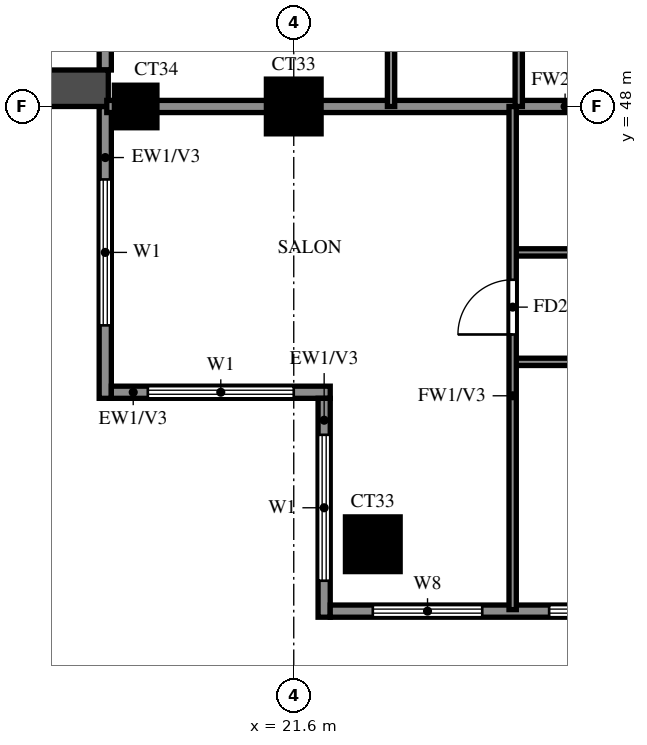
"""IFC4 building model, lengths in metres.
Left out: names, types, materials, properties, quantities, classifications, styles, units other than length and angle.
Written with IfcOpenShell. Run it as: python <this file> out.ifc"""

import sys

from ifc_helpers import new_model, si_unit, direction, frame, frame_2d, origin, origin_2d, place, context, subcontext, project, spatial, rectangle, extrude, source, transform, mapped, element, fill, save


model = new_model("IFC4")
c1 = context("Model", 3, precision=1e-05, world=origin(), true_north=direction((0.0, 1.0)))
c2 = subcontext(c1, "Body", "Model", "MODEL_VIEW")
j1 = project(units=[si_unit("LENGTHUNIT", "METRE"), si_unit("PLANEANGLEUNIT", "RADIAN")], contexts=[c1])
p1 = place(None, origin())
s1 = spatial("IfcSite", under=j1, at=p1, CompositionType="ELEMENT")
p2 = place(p1, origin())
s2 = spatial("IfcBuilding", under=s1, at=p2, CompositionType="ELEMENT")
p3 = place(p2, frame((0.0, 0.0, 225.5)))
s3 = spatial("IfcBuildingStorey", under=s2, at=p3, CompositionType="ELEMENT", Elevation=225.5)
m1 = source(origin(), c2, "Body", "SweptSolid", [
    extrude(rectangle(XDim=0.9, YDim=0.9, at=origin_2d()), origin(), (0.0, 0.0, 1.0), 3.22),
])
p4 = place(p3, frame((22.9, 40.8, 0.0), z_axis=(0.0, 0.0, 1.0), x_axis=(1.0, 0.0, 0.0)))
e1 = element("IfcColumn", 1, at=p4, inside=s3, PredefinedType="COLUMN", context=c2, shape_type="MappedRepresentation", body=[
    mapped(m1, transform((0.0, 0.0, 0.0))),
])
m2 = source(origin(), c2, "Body", "SweptSolid", [
    extrude(rectangle(XDim=0.7, YDim=0.7, at=origin_2d()), origin(), (0.0, 0.0, 1.0), 3.22),
])
p5 = place(p3, frame((19.0, 48.0, 0.0), z_axis=(0.0, 0.0, 1.0), x_axis=(1.0, 0.0, 0.0)))
e2 = element("IfcColumn", 2, at=p5, inside=s3, PredefinedType="COLUMN", context=c2, shape_type="MappedRepresentation", body=[
    mapped(m2, transform((0.0, 0.0, 0.0))),
])
p6 = place(p3, frame((21.6, 48.0, 0.0), z_axis=(0.0, 0.0, 1.0), x_axis=(1.0, 0.0, 0.0)))
e3 = element("IfcColumn", 3, at=p6, inside=s3, PredefinedType="COLUMN", context=c2, shape_type="MappedRepresentation", body=[
    mapped(m1, transform((0.0, 0.0, 0.0))),
])
p7 = place(p3, frame((18.5, 54.6, 0.0), z_axis=(0.0, 0.0, 1.0), x_axis=(0.0, -1.0, 0.0)))
e4 = element("IfcWall", 4, at=p7, inside=s3, PredefinedType="SOLIDWALL", context=c2, shape_type="SweptSolid", body=[
    extrude(rectangle(XDim=6.0, YDim=0.2, at=frame_2d((3.0, 0.0))), origin(), (0.0, 0.0, 1.0), 3.22),
])
p8 = place(p7, frame((0.9, 0.0, 0.0)))
e5 = element("IfcOpeningElement", 5, at=p8, cuts=e4, PredefinedType="OPENING", context=c2, shape_type="SweptSolid", body=[
    extrude(rectangle(XDim=1.8, YDim=2.4, at=frame_2d((0.9, 1.2))), frame((0.0, 0.11, 0.0), z_axis=(0.0, -1.0, 0.0), x_axis=(1.0, 0.0, 0.0)), (0.0, 0.0, 1.0), 0.22),
])
p9 = place(p7, frame((3.5, 0.0, 0.6)))
e6 = element("IfcOpeningElement", 6, at=p9, cuts=e4, PredefinedType="OPENING", context=c2, shape_type="SweptSolid", body=[
    extrude(rectangle(XDim=1.8, YDim=2.4, at=frame_2d((0.9, 1.2))), frame((0.0, 0.11, 0.0), z_axis=(0.0, -1.0, 0.0), x_axis=(1.0, 0.0, 0.0)), (0.0, 0.0, 1.0), 0.22),
])
p10 = place(p3, frame((18.5, 48.0, 0.0), z_axis=(0.0, 0.0, 1.0), x_axis=(0.0, -1.0, 0.0)))
e7 = element("IfcWall", 7, at=p10, inside=s3, PredefinedType="SOLIDWALL", context=c2, shape_type="SweptSolid", body=[
    extrude(rectangle(XDim=4.8, YDim=0.2, at=frame_2d((2.4, 0.0))), origin(), (0.0, 0.0, 1.0), 3.22),
])
p11 = place(p10, frame((1.2, 0.0, 0.6)))
e8 = element("IfcOpeningElement", 8, at=p11, cuts=e7, PredefinedType="OPENING", context=c2, shape_type="SweptSolid", body=[
    extrude(rectangle(XDim=2.4, YDim=2.4, at=frame_2d((1.2, 1.2))), frame((0.0, 0.11, 0.0), z_axis=(0.0, -1.0, 0.0), x_axis=(1.0, 0.0, 0.0)), (0.0, 0.0, 1.0), 0.22),
])
p12 = place(p3, frame((18.6, 43.3, 0.0), z_axis=(0.0, 0.0, 1.0), x_axis=(1.0, 0.0, 0.0)))
e9 = element("IfcWall", 9, at=p12, inside=s3, PredefinedType="SOLIDWALL", context=c2, shape_type="SweptSolid", body=[
    extrude(rectangle(XDim=3.6, YDim=0.2, at=frame_2d((1.8, 0.0))), origin(), (0.0, 0.0, 1.0), 3.22),
])
p13 = place(p12, frame((0.6, 0.0, 0.6)))
e10 = element("IfcOpeningElement", 10, at=p13, cuts=e9, PredefinedType="OPENING", context=c2, shape_type="SweptSolid", body=[
    extrude(rectangle(XDim=2.4, YDim=2.4, at=frame_2d((1.2, 1.2))), frame((0.0, 0.11, 0.0), z_axis=(0.0, -1.0, 0.0), x_axis=(1.0, 0.0, 0.0)), (0.0, 0.0, 1.0), 0.22),
])
p14 = place(p3, frame((22.1, 43.2, 0.0), z_axis=(0.0, 0.0, 1.0), x_axis=(0.0, -1.0, 0.0)))
e11 = element("IfcWall", 11, at=p14, inside=s3, PredefinedType="SOLIDWALL", context=c2, shape_type="SweptSolid", body=[
    extrude(rectangle(XDim=3.6, YDim=0.2, at=frame_2d((1.8, 0.0))), origin(), (0.0, 0.0, 1.0), 3.22),
])
p15 = place(p14, frame((0.6, 0.0, 0.6)))
e12 = element("IfcOpeningElement", 12, at=p15, cuts=e11, PredefinedType="OPENING", context=c2, shape_type="SweptSolid", body=[
    extrude(rectangle(XDim=2.4, YDim=2.4, at=frame_2d((1.2, 1.2))), frame((0.0, 0.11, 0.0), z_axis=(0.0, -1.0, 0.0), x_axis=(1.0, 0.0, 0.0)), (0.0, 0.0, 1.0), 0.22),
])
p16 = place(p3, frame((22.2, 39.7, 0.0), z_axis=(0.0, 0.0, 1.0), x_axis=(1.0, 0.0, 0.0)))
e13 = element("IfcWall", 13, at=p16, inside=s3, PredefinedType="SOLIDWALL", context=c2, shape_type="SweptSolid", body=[
    extrude(rectangle(XDim=19.8, YDim=0.2, at=frame_2d((9.9, 0.0))), origin(), (0.0, 0.0, 1.0), 3.22),
])
p17 = place(p16, frame((9.3, 0.0, 0.0)))
e14 = element("IfcOpeningElement", 14, at=p17, cuts=e13, PredefinedType="OPENING", context=c2, shape_type="SweptSolid", body=[
    extrude(rectangle(XDim=1.8, YDim=2.4, at=frame_2d((0.9, 1.2))), frame((0.0, 0.11, 0.0), z_axis=(0.0, -1.0, 0.0), x_axis=(1.0, 0.0, 0.0)), (0.0, 0.0, 1.0), 0.22),
])
p18 = place(p16, frame((0.7, 0.0, 0.6)))
e15 = element("IfcOpeningElement", 15, at=p18, cuts=e13, PredefinedType="OPENING", context=c2, shape_type="SweptSolid", body=[
    extrude(rectangle(XDim=1.8, YDim=2.4, at=frame_2d((0.9, 1.2))), frame((0.0, 0.11, 0.0), z_axis=(0.0, -1.0, 0.0), x_axis=(1.0, 0.0, 0.0)), (0.0, 0.0, 1.0), 0.22),
])
p19 = place(p16, frame((3.6, 0.0, 0.6)))
e16 = element("IfcOpeningElement", 16, at=p19, cuts=e13, PredefinedType="OPENING", context=c2, shape_type="SweptSolid", body=[
    extrude(rectangle(XDim=2.4, YDim=2.4, at=frame_2d((1.2, 1.2))), frame((0.0, 0.11, 0.0), z_axis=(0.0, -1.0, 0.0), x_axis=(1.0, 0.0, 0.0)), (0.0, 0.0, 1.0), 0.22),
])
p20 = place(p16, frame((6.9, 0.0, 0.6)))
e17 = element("IfcOpeningElement", 17, at=p20, cuts=e13, PredefinedType="OPENING", context=c2, shape_type="SweptSolid", body=[
    extrude(rectangle(XDim=1.8, YDim=2.4, at=frame_2d((0.9, 1.2))), frame((0.0, 0.11, 0.0), z_axis=(0.0, -1.0, 0.0), x_axis=(1.0, 0.0, 0.0)), (0.0, 0.0, 1.0), 0.22),
])
p21 = place(p3, frame((18.55, 48.3, 0.0), z_axis=(0.0, 0.0, 1.0), x_axis=(-1.0, 0.0, 0.0)))
e18 = element("IfcWall", 18, at=p21, inside=s3, PredefinedType="SOLIDWALL", context=c2, shape_type="SweptSolid", body=[
    extrude(rectangle(XDim=2.85, YDim=0.6, at=frame_2d((1.425, 0.0))), origin(), (0.0, 0.0, 1.0), 2.85),
])
p22 = place(p3, frame((18.525, 48.0, 0.0), z_axis=(0.0, 0.0, 1.0), x_axis=(1.0, 0.0, 0.0)))
e19 = element("IfcWall", 19, at=p22, inside=s3, PredefinedType="SOLIDWALL", context=c2, shape_type="SweptSolid", body=[
    extrude(rectangle(XDim=15.075, YDim=0.2, at=frame_2d((7.538, 0.0))), origin(), (0.0, 0.0, 1.0), 3.22),
])
p23 = place(p3, frame((25.2, 43.8, 0.0), z_axis=(0.0, 0.0, 1.0), x_axis=(1.0, 0.0, 0.0)))
e20 = element("IfcWall", 20, at=p23, inside=s3, PredefinedType="PARTITIONING", context=c2, shape_type="SweptSolid", body=[
    extrude(rectangle(XDim=8.4, YDim=0.12, at=frame_2d((4.2, 0.0))), origin(), (0.0, 0.0, 1.0), 3.22),
])
p24 = place(p23, frame((1.35, 0.0, 0.0)))
e21 = element("IfcOpeningElement", 21, at=p24, cuts=e20, PredefinedType="OPENING", context=c2, shape_type="SweptSolid", body=[
    extrude(rectangle(XDim=0.9, YDim=2.1, at=frame_2d((0.45, 1.05))), frame((0.0, 0.07, 0.0), z_axis=(0.0, -1.0, 0.0), x_axis=(1.0, 0.0, 0.0)), (0.0, 0.0, 1.0), 0.14),
])
p25 = place(p23, frame((5.55, 0.0, 0.0)))
e22 = element("IfcOpeningElement", 22, at=p25, cuts=e20, PredefinedType="OPENING", context=c2, shape_type="SweptSolid", body=[
    extrude(rectangle(XDim=0.9, YDim=2.1, at=frame_2d((0.45, 1.05))), frame((0.0, 0.07, 0.0), z_axis=(0.0, -1.0, 0.0), x_axis=(1.0, 0.0, 0.0)), (0.0, 0.0, 1.0), 0.14),
])
p26 = place(p3, frame((25.2, 45.6, 0.0), z_axis=(0.0, 0.0, 1.0), x_axis=(1.0, 0.0, 0.0)))
e23 = element("IfcWall", 23, at=p26, inside=s3, PredefinedType="PARTITIONING", context=c2, shape_type="SweptSolid", body=[
    extrude(rectangle(XDim=6.0, YDim=0.12, at=frame_2d((3.0, 0.0))), origin(), (0.0, 0.0, 1.0), 3.22),
])
p27 = place(p26, frame((1.425, 0.0, 0.0)))
e24 = element("IfcOpeningElement", 24, at=p27, cuts=e23, PredefinedType="OPENING", context=c2, shape_type="SweptSolid", body=[
    extrude(rectangle(XDim=0.9, YDim=2.1, at=frame_2d((0.45, 1.05))), frame((0.0, 0.07, 0.0), z_axis=(0.0, -1.0, 0.0), x_axis=(1.0, 0.0, 0.0)), (0.0, 0.0, 1.0), 0.14),
])
p28 = place(p3, frame((23.2, 48.0, 0.0), z_axis=(0.0, 0.0, 1.0), x_axis=(0.0, 1.0, 0.0)))
e25 = element("IfcWall", 25, at=p28, inside=s3, PredefinedType="PARTITIONING", context=c2, shape_type="SweptSolid", body=[
    extrude(rectangle(XDim=25.2, YDim=0.12, at=frame_2d((12.6, 0.0))), origin(), (0.0, 0.0, 1.0), 3.22),
])
p29 = place(p28, frame((1.35, 0.0, 0.0)))
e26 = element("IfcOpeningElement", 26, at=p29, cuts=e25, PredefinedType="OPENING", context=c2, shape_type="SweptSolid", body=[
    extrude(rectangle(XDim=0.9, YDim=2.1, at=frame_2d((0.45, 1.05))), frame((0.0, 0.07, 0.0), z_axis=(0.0, -1.0, 0.0), x_axis=(1.0, 0.0, 0.0)), (0.0, 0.0, 1.0), 0.14),
])
p30 = place(p28, frame((4.95, 0.0, 0.0)))
e27 = element("IfcOpeningElement", 27, at=p30, cuts=e25, PredefinedType="OPENING", context=c2, shape_type="SweptSolid", body=[
    extrude(rectangle(XDim=0.9, YDim=2.1, at=frame_2d((0.45, 1.05))), frame((0.0, 0.07, 0.0), z_axis=(0.0, -1.0, 0.0), x_axis=(1.0, 0.0, 0.0)), (0.0, 0.0, 1.0), 0.14),
])
p31 = place(p28, frame((10.05, 0.0, 0.0)))
e28 = element("IfcOpeningElement", 28, at=p31, cuts=e25, PredefinedType="OPENING", context=c2, shape_type="SweptSolid", body=[
    extrude(rectangle(XDim=1.5, YDim=2.1, at=frame_2d((0.75, 1.05))), frame((0.0, 0.07, 0.0), z_axis=(0.0, -1.0, 0.0), x_axis=(1.0, 0.0, 0.0)), (0.0, 0.0, 1.0), 0.14),
])
p32 = place(p28, frame((15.75, 0.0, 0.0)))
e29 = element("IfcOpeningElement", 29, at=p32, cuts=e25, PredefinedType="OPENING", context=c2, shape_type="SweptSolid", body=[
    extrude(rectangle(XDim=0.9, YDim=2.1, at=frame_2d((0.45, 1.05))), frame((0.0, 0.07, 0.0), z_axis=(0.0, -1.0, 0.0), x_axis=(1.0, 0.0, 0.0)), (0.0, 0.0, 1.0), 0.14),
])
p33 = place(p28, frame((19.35, 0.0, 0.0)))
e30 = element("IfcOpeningElement", 30, at=p33, cuts=e25, PredefinedType="OPENING", context=c2, shape_type="SweptSolid", body=[
    extrude(rectangle(XDim=0.9, YDim=2.1, at=frame_2d((0.45, 1.05))), frame((0.0, 0.07, 0.0), z_axis=(0.0, -1.0, 0.0), x_axis=(1.0, 0.0, 0.0)), (0.0, 0.0, 1.0), 0.14),
])
p34 = place(p28, frame((22.95, 0.0, 0.0)))
e31 = element("IfcOpeningElement", 31, at=p34, cuts=e25, PredefinedType="OPENING", context=c2, shape_type="SweptSolid", body=[
    extrude(rectangle(XDim=0.9, YDim=2.1, at=frame_2d((0.45, 1.05))), frame((0.0, 0.07, 0.0), z_axis=(0.0, -1.0, 0.0), x_axis=(1.0, 0.0, 0.0)), (0.0, 0.0, 1.0), 0.14),
])
p35 = place(p3, frame((25.2, 39.725, 0.0), z_axis=(0.0, 0.0, 1.0), x_axis=(0.0, 1.0, 0.0)))
e32 = element("IfcWall", 32, at=p35, inside=s3, PredefinedType="PARTITIONING", context=c2, shape_type="SweptSolid", body=[
    extrude(rectangle(XDim=8.275, YDim=0.12, at=frame_2d((4.137, 0.0))), origin(), (0.0, 0.0, 1.0), 3.22),
])
p36 = place(p35, frame((4.525, 0.0, 0.0)))
e33 = element("IfcOpeningElement", 33, at=p36, cuts=e32, PredefinedType="OPENING", context=c2, shape_type="SweptSolid", body=[
    extrude(rectangle(XDim=0.9, YDim=2.1, at=frame_2d((0.45, 1.05))), frame((0.0, 0.07, 0.0), z_axis=(0.0, -1.0, 0.0), x_axis=(1.0, 0.0, 0.0)), (0.0, 0.0, 1.0), 0.14),
])
p37 = place(p3, frame((25.3, 48.0, 0.0), z_axis=(0.0, 0.0, 1.0), x_axis=(0.0, 1.0, 0.0)))
e34 = element("IfcWall", 34, at=p37, inside=s3, PredefinedType="PARTITIONING", context=c2, shape_type="SweptSolid", body=[
    extrude(rectangle(XDim=7.2, YDim=0.12, at=frame_2d((3.6, 0.0))), origin(), (0.0, 0.0, 1.0), 3.22),
])
p38 = place(p37, frame((1.975, 0.0, 0.0)))
e35 = element("IfcOpeningElement", 35, at=p38, cuts=e34, PredefinedType="OPENING", context=c2, shape_type="SweptSolid", body=[
    extrude(rectangle(XDim=0.9, YDim=2.1, at=frame_2d((0.45, 1.05))), frame((0.0, 0.07, 0.0), z_axis=(0.0, -1.0, 0.0), x_axis=(1.0, 0.0, 0.0)), (0.0, 0.0, 1.0), 0.14),
])
p39 = place(p11, origin())
e36 = element("IfcWindow", 36, at=p39, inside=s3, PartitioningType="DOUBLE_PANEL_VERTICAL", PredefinedType="WINDOW", context=c2, shape_type="SweptSolid", body=[
    extrude(rectangle(XDim=2.4, YDim=2.4, at=frame_2d((1.2, 1.2))), frame((0.0, 0.03, 0.0), z_axis=(0.0, -1.0, 0.0), x_axis=(1.0, 0.0, 0.0)), (0.0, 0.0, 1.0), 0.06),
])
fill(e8, e36)
p40 = place(p13, origin())
e37 = element("IfcWindow", 37, at=p40, inside=s3, PartitioningType="DOUBLE_PANEL_VERTICAL", PredefinedType="WINDOW", context=c2, shape_type="SweptSolid", body=[
    extrude(rectangle(XDim=2.4, YDim=2.4, at=frame_2d((1.2, 1.2))), frame((0.0, 0.03, 0.0), z_axis=(0.0, -1.0, 0.0), x_axis=(1.0, 0.0, 0.0)), (0.0, 0.0, 1.0), 0.06),
])
fill(e10, e37)
p41 = place(p15, origin())
e38 = element("IfcWindow", 38, at=p41, inside=s3, PartitioningType="DOUBLE_PANEL_VERTICAL", PredefinedType="WINDOW", context=c2, shape_type="SweptSolid", body=[
    extrude(rectangle(XDim=2.4, YDim=2.4, at=frame_2d((1.2, 1.2))), frame((0.0, 0.03, 0.0), z_axis=(0.0, -1.0, 0.0), x_axis=(1.0, 0.0, 0.0)), (0.0, 0.0, 1.0), 0.06),
])
fill(e12, e38)
p42 = place(p18, origin())
e39 = element("IfcWindow", 39, at=p42, inside=s3, PartitioningType="DOUBLE_PANEL_VERTICAL", PredefinedType="WINDOW", context=c2, shape_type="SweptSolid", body=[
    extrude(rectangle(XDim=1.8, YDim=2.4, at=frame_2d((0.9, 1.2))), frame((0.0, 0.03, 0.0), z_axis=(0.0, -1.0, 0.0), x_axis=(1.0, 0.0, 0.0)), (0.0, 0.0, 1.0), 0.06),
])
fill(e15, e39)
p43 = place(p19, origin())
e40 = element("IfcWindow", 40, at=p43, inside=s3, PartitioningType="DOUBLE_PANEL_VERTICAL", PredefinedType="WINDOW", context=c2, shape_type="SweptSolid", body=[
    extrude(rectangle(XDim=2.4, YDim=2.4, at=frame_2d((1.2, 1.2))), frame((0.0, 0.03, 0.0), z_axis=(0.0, -1.0, 0.0), x_axis=(1.0, 0.0, 0.0)), (0.0, 0.0, 1.0), 0.06),
])
fill(e16, e40)
p44 = place(p36, origin())
e41 = element("IfcDoor", 41, at=p44, inside=s3, OperationType="SINGLE_SWING_LEFT", PredefinedType="DOOR", context=c2, shape_type="SweptSolid", body=[
    extrude(rectangle(XDim=0.9, YDim=2.1, at=frame_2d((0.45, 1.05))), frame((0.0, 0.025, 0.0), z_axis=(0.0, -1.0, 0.0), x_axis=(1.0, 0.0, 0.0)), (0.0, 0.0, 1.0), 0.05),
])
fill(e33, e41)
save(model, sys.argv[1])
